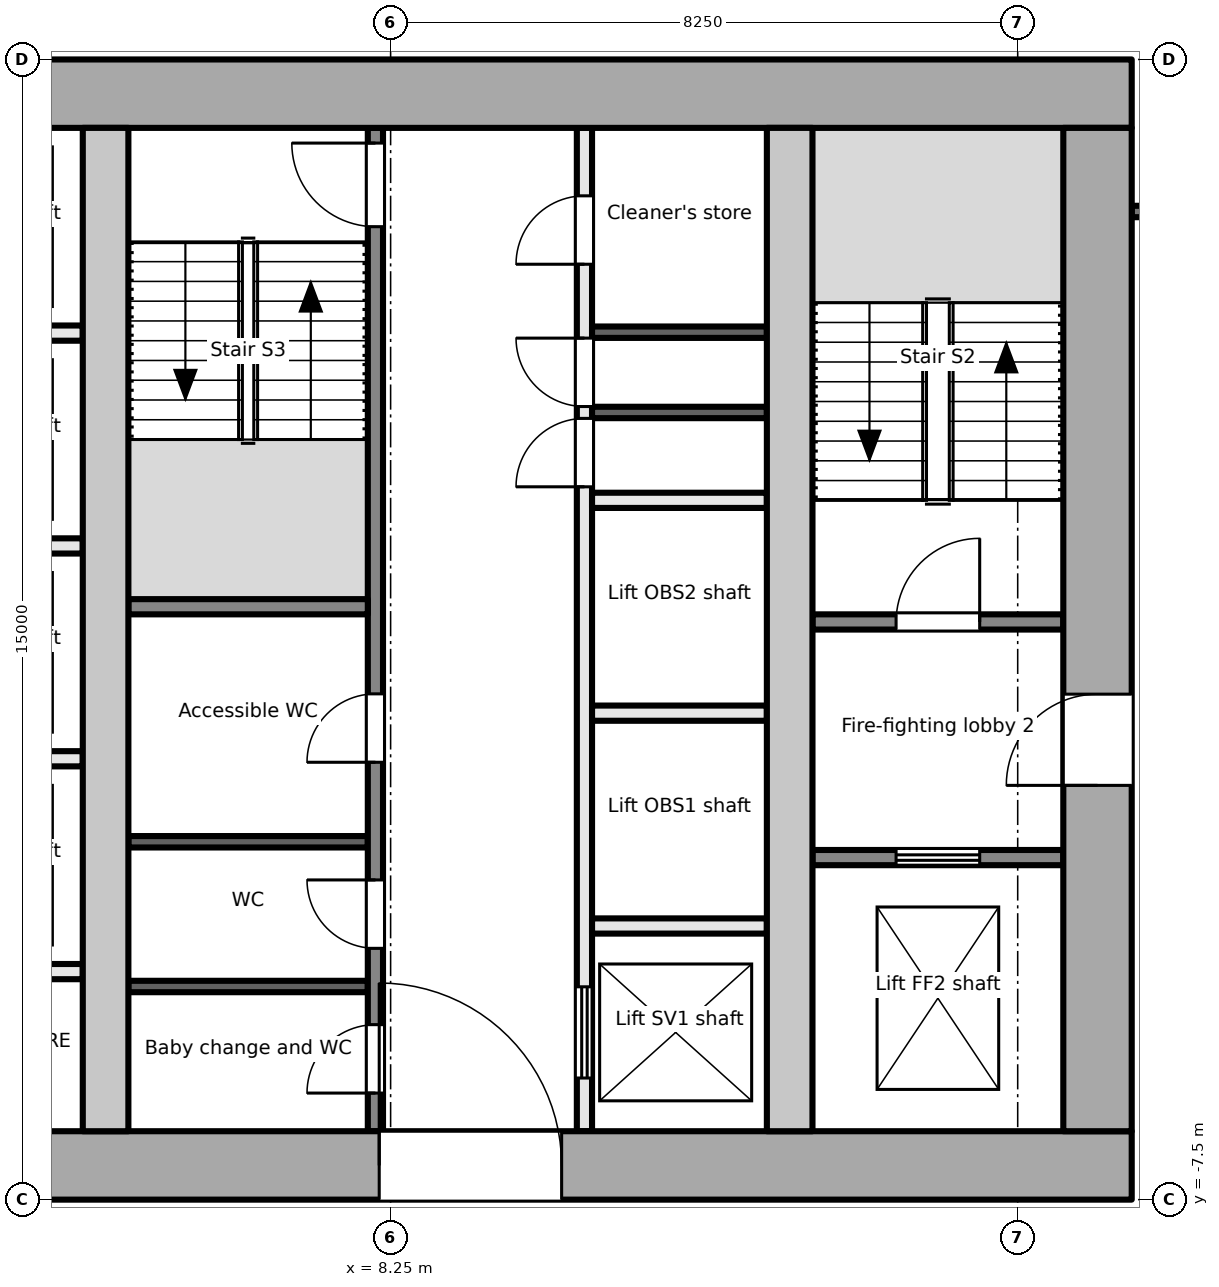
"""IFC4 building model, lengths in metres.
Left out: names, types, materials, properties, quantities, classifications, styles, units other than length and angle.
Written with IfcOpenShell. Run it as: python <this file> out.ifc"""

import sys

from ifc_helpers import new_model, si_unit, direction, frame, frame_2d, origin, place, context, subcontext, project, spatial, rectangle, extrude, element, fill, save


model = new_model("IFC4")
c1 = context("Model", 3, precision=1e-05, world=origin(), true_north=direction((0.0, 1.0)))
c2 = subcontext(c1, "Body", "Model", "MODEL_VIEW")
j1 = project(units=[si_unit("LENGTHUNIT", "METRE"), si_unit("PLANEANGLEUNIT", "RADIAN")], contexts=[c1])
p1 = place(None, origin())
s1 = spatial("IfcSite", under=j1, at=p1, CompositionType="ELEMENT")
p2 = place(p1, origin())
s2 = spatial("IfcBuilding", under=s1, at=p2, CompositionType="ELEMENT")
p3 = place(p2, frame((0.0, 0.0, 233.0)))
s3 = spatial("IfcBuildingStorey", under=s2, at=p3, CompositionType="ELEMENT", Elevation=233.0)
p4 = place(p3, frame((-18.0, -7.05, -0.2), z_axis=(0.0, 0.0, 1.0), x_axis=(1.0, 0.0, 0.0)))
e1 = element("IfcWall", 1, at=p4, inside=s3, PredefinedType="SHEAR", context=c2, shape_type="SweptSolid", body=[
    extrude(rectangle(XDim=36.0, YDim=0.9, at=frame_2d((18.0, 0.0))), origin(), (0.0, 0.0, 1.0), 3.9),
])
p5 = place(p4, frame((8.1, 0.0, 0.2)))
e2 = element("IfcOpeningElement", 2, at=p5, cuts=e1, PredefinedType="OPENING", context=c2, shape_type="SweptSolid", body=[
    extrude(rectangle(XDim=1.8, YDim=2.1, at=frame_2d((0.9, 1.05))), frame((0.0, 0.46, 0.0), z_axis=(0.0, -1.0, 0.0), x_axis=(1.0, 0.0, 0.0)), (0.0, 0.0, 1.0), 0.921),
])
p6 = place(p4, frame((16.8, 0.0, 0.2)))
e3 = element("IfcOpeningElement", 3, at=p6, cuts=e1, PredefinedType="OPENING", context=c2, shape_type="SweptSolid", body=[
    extrude(rectangle(XDim=2.4, YDim=2.1, at=frame_2d((1.2, 1.05))), frame((0.0, 0.46, 0.0), z_axis=(0.0, -1.0, 0.0), x_axis=(1.0, 0.0, 0.0)), (0.0, 0.0, 1.0), 0.921),
])
p7 = place(p4, frame((26.1, 0.0, 0.2)))
e4 = element("IfcOpeningElement", 4, at=p7, cuts=e1, PredefinedType="OPENING", context=c2, shape_type="SweptSolid", body=[
    extrude(rectangle(XDim=2.4, YDim=2.1, at=frame_2d((1.2, 1.05))), frame((0.0, 0.46, 0.0), z_axis=(0.0, -1.0, 0.0), x_axis=(1.0, 0.0, 0.0)), (0.0, 0.0, 1.0), 0.921),
])
p8 = place(p3, frame((-18.0, 7.05, -0.2), z_axis=(0.0, 0.0, 1.0), x_axis=(1.0, 0.0, 0.0)))
e5 = element("IfcWall", 5, at=p8, inside=s3, PredefinedType="SHEAR", context=c2, shape_type="SweptSolid", body=[
    extrude(rectangle(XDim=36.0, YDim=0.9, at=frame_2d((18.0, 0.0))), origin(), (0.0, 0.0, 1.0), 3.9),
])
p9 = place(p3, frame((17.55, -6.6, -0.2), z_axis=(0.0, 0.0, 1.0), x_axis=(0.0, 1.0, 0.0)))
e6 = element("IfcWall", 6, at=p9, inside=s3, PredefinedType="SHEAR", context=c2, shape_type="SweptSolid", body=[
    extrude(rectangle(XDim=13.2, YDim=0.9, at=frame_2d((6.6, 0.0))), origin(), (0.0, 0.0, 1.0), 3.9),
])
p10 = place(p9, frame((4.55, 0.0, 0.2)))
e7 = element("IfcOpeningElement", 7, at=p10, cuts=e6, PredefinedType="OPENING", context=c2, shape_type="SweptSolid", body=[
    extrude(rectangle(XDim=1.2, YDim=2.1, at=frame_2d((0.6, 1.05))), frame((0.0, 0.46, 0.0), z_axis=(0.0, -1.0, 0.0), x_axis=(1.0, 0.0, 0.0)), (0.0, 0.0, 1.0), 0.921),
])
for number, where, z_axis, x_axis in (
    (8, (4.5, -6.6, -0.2), (0.0, 0.0, 1.0), (0.0, 1.0, 0.0)),
    (9, (13.5, -6.6, -0.2), (0.0, 0.0, 1.0), (0.0, 1.0, 0.0)),
):
    element("IfcWall", number, at=place(p3, frame(where, z_axis=z_axis, x_axis=x_axis)), inside=s3, PredefinedType="SHEAR", context=c2, shape_type="SweptSolid", body=[
        extrude(rectangle(XDim=13.2, YDim=0.6, at=frame_2d((6.6, 0.0))), origin(), (0.0, 0.0, 1.0), 3.9),
    ])
p11 = place(p3, frame((13.8, -3.0, 0.0), z_axis=(0.0, 0.0, 1.0), x_axis=(1.0, 0.0, 0.0)))
e10 = element("IfcWall", 10, at=p11, inside=s3, PredefinedType="PARTITIONING", context=c2, shape_type="SweptSolid", body=[
    extrude(rectangle(XDim=3.3, YDim=0.2, at=frame_2d((1.65, 0.0))), origin(), (0.0, 0.0, 1.0), 3.7),
])
p12 = place(p11, frame((1.1, 0.0, 0.0)))
e11 = element("IfcOpeningElement", 11, at=p12, cuts=e10, PredefinedType="OPENING", context=c2, shape_type="SweptSolid", body=[
    extrude(rectangle(XDim=1.1, YDim=2.1, at=frame_2d((0.55, 1.05))), frame((0.0, 0.111, 0.0), z_axis=(0.0, -1.0, 0.0), x_axis=(1.0, 0.0, 0.0)), (0.0, 0.0, 1.0), 0.221),
])
p13 = place(p3, frame((13.8, 0.1, 0.0), z_axis=(0.0, 0.0, 1.0), x_axis=(1.0, 0.0, 0.0)))
e12 = element("IfcWall", 12, at=p13, inside=s3, PredefinedType="PARTITIONING", context=c2, shape_type="SweptSolid", body=[
    extrude(rectangle(XDim=3.3, YDim=0.2, at=frame_2d((1.65, 0.0))), origin(), (0.0, 0.0, 1.0), 3.7),
])
p14 = place(p13, frame((1.1, 0.0, 0.0)))
e13 = element("IfcOpeningElement", 13, at=p14, cuts=e12, PredefinedType="OPENING", context=c2, shape_type="SweptSolid", body=[
    extrude(rectangle(XDim=1.1, YDim=2.1, at=frame_2d((0.55, 1.05))), frame((0.0, 0.111, 0.0), z_axis=(0.0, -1.0, 0.0), x_axis=(1.0, 0.0, 0.0)), (0.0, 0.0, 1.0), 0.221),
])
for number, where, z_axis, x_axis in (
    (14, (1.9, -1.7, 0.0), (0.0, 0.0, 1.0), (1.0, 0.0, 0.0)),
    (15, (1.9, 1.1, 0.0), (0.0, 0.0, 1.0), (1.0, 0.0, 0.0)),
    (16, (1.9, 3.9, 0.0), (0.0, 0.0, 1.0), (1.0, 0.0, 0.0)),
    (17, (1.9, -4.5, 0.0), (0.0, 0.0, 1.0), (1.0, 0.0, 0.0)),
):
    element("IfcWall", number, at=place(p3, frame(where, z_axis=z_axis, x_axis=x_axis)), inside=s3, PredefinedType="PARTITIONING", context=c2, shape_type="SweptSolid", body=[
        extrude(rectangle(XDim=2.3, YDim=0.2, at=frame_2d((1.15, 0.0))), origin(), (0.0, 0.0, 1.0), 3.7),
    ])
p15 = place(p3, frame((8.05, -6.6, 0.0), z_axis=(0.0, 0.0, 1.0), x_axis=(0.0, 1.0, 0.0)))
e18 = element("IfcWall", 18, at=p15, inside=s3, PredefinedType="PARTITIONING", context=c2, shape_type="SweptSolid", body=[
    extrude(rectangle(XDim=13.2, YDim=0.2, at=frame_2d((6.6, 0.0))), origin(), (0.0, 0.0, 1.0), 3.7),
])
p16 = place(p15, frame((0.502, 0.0, 0.0)))
e19 = element("IfcOpeningElement", 19, at=p16, cuts=e18, PredefinedType="OPENING", context=c2, shape_type="SweptSolid", body=[
    extrude(rectangle(XDim=0.9, YDim=2.1, at=frame_2d((0.45, 1.05))), frame((0.0, 0.111, 0.0), z_axis=(0.0, -1.0, 0.0), x_axis=(1.0, 0.0, 0.0)), (0.0, 0.0, 1.0), 0.221),
])
p17 = place(p15, frame((2.406, 0.0, 0.0)))
e20 = element("IfcOpeningElement", 20, at=p17, cuts=e18, PredefinedType="OPENING", context=c2, shape_type="SweptSolid", body=[
    extrude(rectangle(XDim=0.9, YDim=2.1, at=frame_2d((0.45, 1.05))), frame((0.0, 0.111, 0.0), z_axis=(0.0, -1.0, 0.0), x_axis=(1.0, 0.0, 0.0)), (0.0, 0.0, 1.0), 0.221),
])
p18 = place(p15, frame((4.854, 0.0, 0.0)))
e21 = element("IfcOpeningElement", 21, at=p18, cuts=e18, PredefinedType="OPENING", context=c2, shape_type="SweptSolid", body=[
    extrude(rectangle(XDim=0.9, YDim=2.1, at=frame_2d((0.45, 1.05))), frame((0.0, 0.111, 0.0), z_axis=(0.0, -1.0, 0.0), x_axis=(1.0, 0.0, 0.0)), (0.0, 0.0, 1.0), 0.221),
])
p19 = place(p15, frame((11.9, 0.0, 0.0)))
e22 = element("IfcOpeningElement", 22, at=p19, cuts=e18, PredefinedType="OPENING", context=c2, shape_type="SweptSolid", body=[
    extrude(rectangle(XDim=1.1, YDim=2.1, at=frame_2d((0.55, 1.05))), frame((0.0, 0.111, 0.0), z_axis=(0.0, -1.0, 0.0), x_axis=(1.0, 0.0, 0.0)), (0.0, 0.0, 1.0), 0.221),
])
p20 = place(p3, frame((10.8, -6.6, 0.0), z_axis=(0.0, 0.0, 1.0), x_axis=(0.0, 1.0, 0.0)))
e23 = element("IfcWall", 23, at=p20, inside=s3, PredefinedType="PARTITIONING", context=c2, shape_type="SweptSolid", body=[
    extrude(rectangle(XDim=13.2, YDim=0.2, at=frame_2d((6.6, 0.0))), origin(), (0.0, 0.0, 1.0), 3.7),
])
p21 = place(p20, frame((0.7, 0.0, 0.0)))
e24 = element("IfcOpeningElement", 24, at=p21, cuts=e23, PredefinedType="OPENING", context=c2, shape_type="SweptSolid", body=[
    extrude(rectangle(XDim=1.2, YDim=2.1, at=frame_2d((0.6, 1.05))), frame((0.0, 0.111, 0.0), z_axis=(0.0, -1.0, 0.0), x_axis=(1.0, 0.0, 0.0)), (0.0, 0.0, 1.0), 0.221),
])
p22 = place(p20, frame((8.478, 0.0, 0.0)))
e25 = element("IfcOpeningElement", 25, at=p22, cuts=e23, PredefinedType="OPENING", context=c2, shape_type="SweptSolid", body=[
    extrude(rectangle(XDim=0.9, YDim=2.1, at=frame_2d((0.45, 1.05))), frame((0.0, 0.111, 0.0), z_axis=(0.0, -1.0, 0.0), x_axis=(1.0, 0.0, 0.0)), (0.0, 0.0, 1.0), 0.221),
])
p23 = place(p20, frame((9.534, 0.0, 0.0)))
e26 = element("IfcOpeningElement", 26, at=p23, cuts=e23, PredefinedType="OPENING", context=c2, shape_type="SweptSolid", body=[
    extrude(rectangle(XDim=0.9, YDim=2.1, at=frame_2d((0.45, 1.05))), frame((0.0, 0.111, 0.0), z_axis=(0.0, -1.0, 0.0), x_axis=(1.0, 0.0, 0.0)), (0.0, 0.0, 1.0), 0.221),
])
p24 = place(p20, frame((11.406, 0.0, 0.0)))
e27 = element("IfcOpeningElement", 27, at=p24, cuts=e23, PredefinedType="OPENING", context=c2, shape_type="SweptSolid", body=[
    extrude(rectangle(XDim=0.9, YDim=2.1, at=frame_2d((0.45, 1.05))), frame((0.0, 0.111, 0.0), z_axis=(0.0, -1.0, 0.0), x_axis=(1.0, 0.0, 0.0)), (0.0, 0.0, 1.0), 0.221),
])
p25 = place(p3, frame((4.8, 0.3, 0.0), z_axis=(0.0, 0.0, 1.0), x_axis=(1.0, 0.0, 0.0)))
e28 = element("IfcWall", 28, at=p25, inside=s3, PredefinedType="PARTITIONING", context=c2, shape_type="SweptSolid", body=[
    extrude(rectangle(XDim=3.15, YDim=0.2, at=frame_2d((1.575, 0.0))), origin(), (0.0, 0.0, 1.0), 3.7),
])
for number, where, z_axis, x_axis in (
    (29, (4.8, -4.696, 0.0), (0.0, 0.0, 1.0), (1.0, 0.0, 0.0)),
    (30, (4.8, -2.792, 0.0), (0.0, 0.0, 1.0), (1.0, 0.0, 0.0)),
):
    element("IfcWall", number, at=place(p3, frame(where, z_axis=z_axis, x_axis=x_axis)), inside=s3, PredefinedType="PARTITIONING", context=c2, shape_type="SweptSolid", body=[
        extrude(rectangle(XDim=3.15, YDim=0.15, at=frame_2d((1.575, 0.0))), origin(), (0.0, 0.0, 1.0), 3.7),
    ])
for number, where, z_axis, x_axis in (
    (31, (10.9, -3.9, 0.0), (0.0, 0.0, 1.0), (1.0, 0.0, 0.0)),
    (32, (10.9, -1.1, 0.0), (0.0, 0.0, 1.0), (1.0, 0.0, 0.0)),
    (33, (10.9, 1.7, 0.0), (0.0, 0.0, 1.0), (1.0, 0.0, 0.0)),
):
    element("IfcWall", number, at=place(p3, frame(where, z_axis=z_axis, x_axis=x_axis)), inside=s3, PredefinedType="PARTITIONING", context=c2, shape_type="SweptSolid", body=[
        extrude(rectangle(XDim=2.3, YDim=0.2, at=frame_2d((1.15, 0.0))), origin(), (0.0, 0.0, 1.0), 3.7),
    ])
for number, where, z_axis, x_axis in (
    (34, (10.9, 2.856, 0.0), (0.0, 0.0, 1.0), (1.0, 0.0, 0.0)),
    (35, (10.9, 3.912, 0.0), (0.0, 0.0, 1.0), (1.0, 0.0, 0.0)),
):
    element("IfcWall", number, at=place(p3, frame(where, z_axis=z_axis, x_axis=x_axis)), inside=s3, PredefinedType="PARTITIONING", context=c2, shape_type="SweptSolid", body=[
        extrude(rectangle(XDim=2.3, YDim=0.15, at=frame_2d((1.15, 0.0))), origin(), (0.0, 0.0, 1.0), 3.7),
    ])
p26 = place(p3, frame((18.0, 5.5, 0.0), z_axis=(0.0, 0.0, 1.0), x_axis=(1.0, 0.0, 0.0)))
e36 = element("IfcWall", 36, at=p26, inside=s3, PredefinedType="PARTITIONING", context=c2, shape_type="SweptSolid", body=[
    extrude(rectangle(XDim=2.7, YDim=0.15, at=frame_2d((1.35, 0.0))), origin(), (0.0, 0.0, 1.0), 3.7),
])
p27 = place(p26, frame((0.55, 0.0, 0.0)))
e37 = element("IfcOpeningElement", 37, at=p27, cuts=e36, PredefinedType="OPENING", context=c2, shape_type="SweptSolid", body=[
    extrude(rectangle(XDim=1.8, YDim=2.1, at=frame_2d((0.9, 1.05))), frame((0.0, 0.085, 0.0), z_axis=(0.0, -1.0, 0.0), x_axis=(1.0, 0.0, 0.0)), (0.0, 0.0, 1.0), 0.171),
])
p28 = place(p12, origin())
e38 = element("IfcDoor", 38, at=p28, inside=s3, OperationType="DOUBLE_DOOR_SLIDING", PredefinedType="DOOR", context=c2, shape_type="SweptSolid", body=[
    extrude(rectangle(XDim=1.1, YDim=2.1, at=frame_2d((0.55, 1.05))), frame((0.0, 0.025, 0.0), z_axis=(0.0, -1.0, 0.0), x_axis=(1.0, 0.0, 0.0)), (0.0, 0.0, 1.0), 0.05),
])
fill(e11, e38)
p29 = place(p10, origin())
e39 = element("IfcDoor", 39, at=p29, inside=s3, OperationType="SINGLE_SWING_LEFT", PredefinedType="DOOR", context=c2, shape_type="SweptSolid", body=[
    extrude(rectangle(XDim=1.2, YDim=2.1, at=frame_2d((0.6, 1.05))), frame((0.0, 0.025, 0.0), z_axis=(0.0, -1.0, 0.0), x_axis=(1.0, 0.0, 0.0)), (0.0, 0.0, 1.0), 0.05),
])
fill(e7, e39)
p30 = place(p14, origin())
e40 = element("IfcDoor", 40, at=p30, inside=s3, OperationType="SINGLE_SWING_RIGHT", PredefinedType="DOOR", context=c2, shape_type="SweptSolid", body=[
    extrude(rectangle(XDim=1.1, YDim=2.1, at=frame_2d((0.55, 1.05))), frame((0.0, 0.025, 0.0), z_axis=(0.0, -1.0, 0.0), x_axis=(1.0, 0.0, 0.0)), (0.0, 0.0, 1.0), 0.05),
])
fill(e13, e40)
p31 = place(p16, origin())
e41 = element("IfcDoor", 41, at=p31, inside=s3, OperationType="SINGLE_SWING_LEFT", PredefinedType="DOOR", context=c2, shape_type="SweptSolid", body=[
    extrude(rectangle(XDim=0.9, YDim=2.1, at=frame_2d((0.45, 1.05))), frame((0.0, 0.025, 0.0), z_axis=(0.0, -1.0, 0.0), x_axis=(1.0, 0.0, 0.0)), (0.0, 0.0, 1.0), 0.05),
])
fill(e19, e41)
p32 = place(p17, origin())
e42 = element("IfcDoor", 42, at=p32, inside=s3, OperationType="SINGLE_SWING_RIGHT", PredefinedType="DOOR", context=c2, shape_type="SweptSolid", body=[
    extrude(rectangle(XDim=0.9, YDim=2.1, at=frame_2d((0.45, 1.05))), frame((0.0, 0.025, 0.0), z_axis=(0.0, -1.0, 0.0), x_axis=(1.0, 0.0, 0.0)), (0.0, 0.0, 1.0), 0.05),
])
fill(e20, e42)
p33 = place(p18, origin())
e43 = element("IfcDoor", 43, at=p33, inside=s3, OperationType="SINGLE_SWING_LEFT", PredefinedType="DOOR", context=c2, shape_type="SweptSolid", body=[
    extrude(rectangle(XDim=0.9, YDim=2.1, at=frame_2d((0.45, 1.05))), frame((0.0, 0.025, 0.0), z_axis=(0.0, -1.0, 0.0), x_axis=(1.0, 0.0, 0.0)), (0.0, 0.0, 1.0), 0.05),
])
fill(e21, e43)
p34 = place(p19, origin())
e44 = element("IfcDoor", 44, at=p34, inside=s3, OperationType="SINGLE_SWING_RIGHT", PredefinedType="DOOR", context=c2, shape_type="SweptSolid", body=[
    extrude(rectangle(XDim=1.1, YDim=2.1, at=frame_2d((0.55, 1.05))), frame((0.0, 0.025, 0.0), z_axis=(0.0, -1.0, 0.0), x_axis=(1.0, 0.0, 0.0)), (0.0, 0.0, 1.0), 0.05),
])
fill(e22, e44)
p35 = place(p7, origin())
e45 = element("IfcDoor", 45, at=p35, inside=s3, OperationType="DOUBLE_DOOR_DOUBLE_SWING", PredefinedType="DOOR", context=c2, shape_type="SweptSolid", body=[
    extrude(rectangle(XDim=2.4, YDim=2.1, at=frame_2d((1.2, 1.05))), frame((0.0, 0.025, 0.0), z_axis=(0.0, -1.0, 0.0), x_axis=(1.0, 0.0, 0.0)), (0.0, 0.0, 1.0), 0.05),
])
fill(e4, e45)
p36 = place(p21, origin())
e46 = element("IfcDoor", 46, at=p36, inside=s3, OperationType="DOUBLE_DOOR_SLIDING", PredefinedType="DOOR", context=c2, shape_type="SweptSolid", body=[
    extrude(rectangle(XDim=1.2, YDim=2.1, at=frame_2d((0.6, 1.05))), frame((0.0, 0.025, 0.0), z_axis=(0.0, -1.0, 0.0), x_axis=(1.0, 0.0, 0.0)), (0.0, 0.0, 1.0), 0.05),
])
fill(e24, e46)
p37 = place(p22, origin())
e47 = element("IfcDoor", 47, at=p37, inside=s3, OperationType="SINGLE_SWING_LEFT", PredefinedType="DOOR", context=c2, shape_type="SweptSolid", body=[
    extrude(rectangle(XDim=0.9, YDim=2.1, at=frame_2d((0.45, 1.05))), frame((0.0, 0.025, 0.0), z_axis=(0.0, -1.0, 0.0), x_axis=(1.0, 0.0, 0.0)), (0.0, 0.0, 1.0), 0.05),
])
fill(e25, e47)
p38 = place(p23, origin())
e48 = element("IfcDoor", 48, at=p38, inside=s3, OperationType="SINGLE_SWING_RIGHT", PredefinedType="DOOR", context=c2, shape_type="SweptSolid", body=[
    extrude(rectangle(XDim=0.9, YDim=2.1, at=frame_2d((0.45, 1.05))), frame((0.0, 0.025, 0.0), z_axis=(0.0, -1.0, 0.0), x_axis=(1.0, 0.0, 0.0)), (0.0, 0.0, 1.0), 0.05),
])
fill(e26, e48)
p39 = place(p24, origin())
e49 = element("IfcDoor", 49, at=p39, inside=s3, OperationType="SINGLE_SWING_LEFT", PredefinedType="DOOR", context=c2, shape_type="SweptSolid", body=[
    extrude(rectangle(XDim=0.9, YDim=2.1, at=frame_2d((0.45, 1.05))), frame((0.0, 0.025, 0.0), z_axis=(0.0, -1.0, 0.0), x_axis=(1.0, 0.0, 0.0)), (0.0, 0.0, 1.0), 0.05),
])
fill(e27, e49)
save(model, sys.argv[1])
